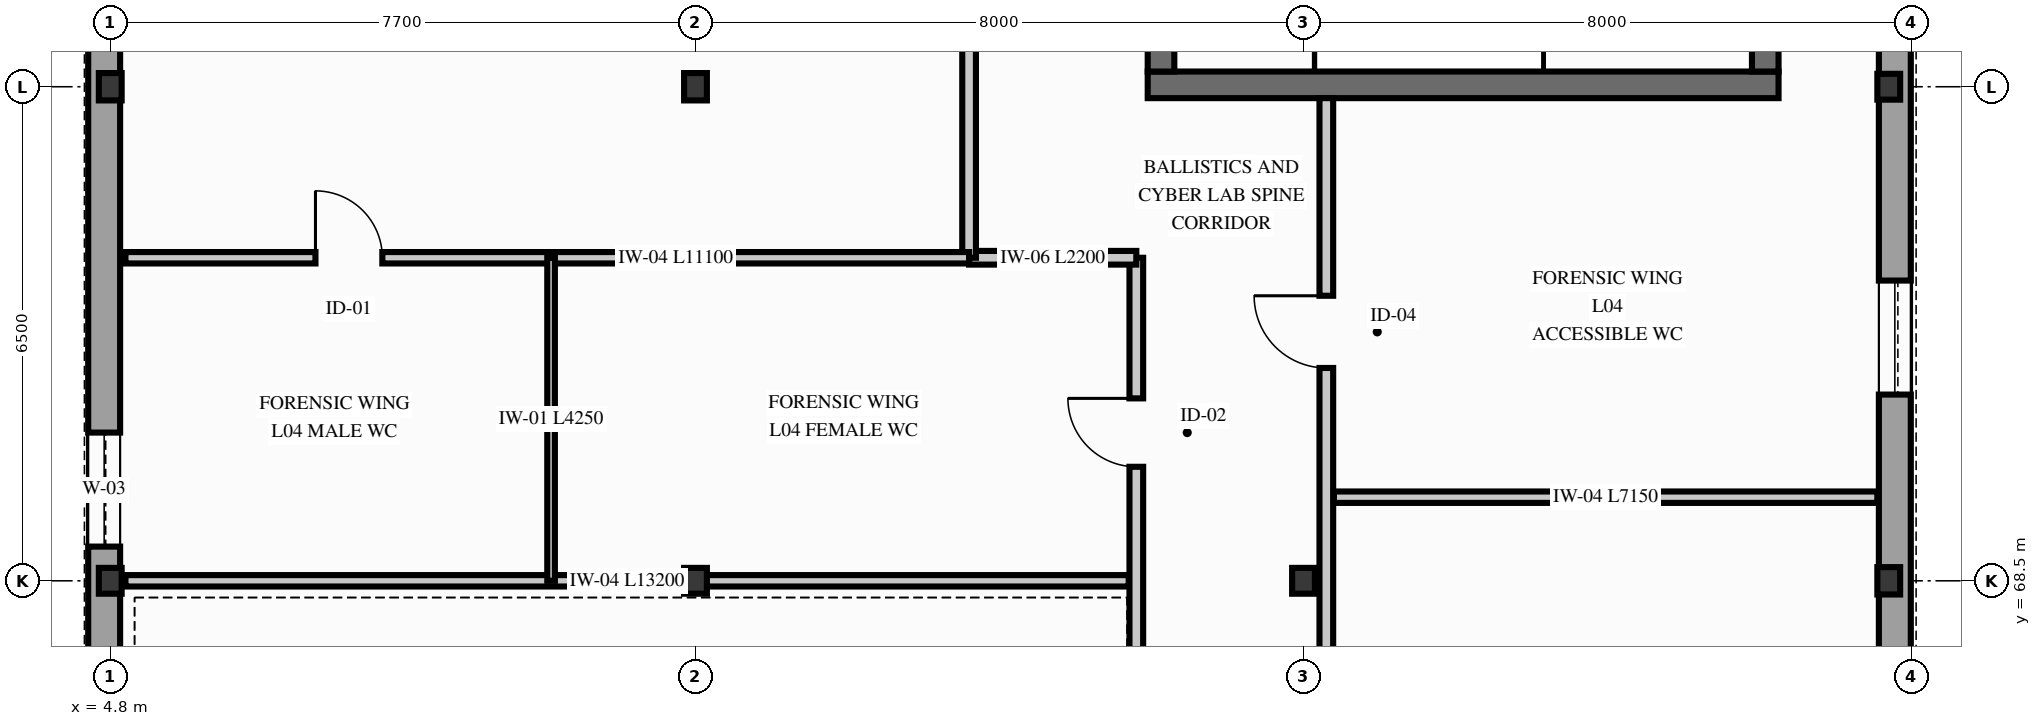
"""IFC4 building model, lengths in metres.
Left out: names, types, materials, properties, quantities, classifications, styles, units other than length and angle.
Written with IfcOpenShell. Run it as: python <this file> out.ifc"""

import sys

from ifc_helpers import new_model, si_unit, direction, frame, frame_2d, origin, origin_2d, place, context, subcontext, project, spatial, rectangle, i_section, extrude, element, fill, save


model = new_model("IFC4")
c1 = context("Model", 3, precision=1e-05, world=origin(), true_north=direction((0.0, 1.0)))
c2 = subcontext(c1, "Body", "Model", "MODEL_VIEW")
j1 = project(units=[si_unit("LENGTHUNIT", "METRE"), si_unit("PLANEANGLEUNIT", "RADIAN")], contexts=[c1])
p1 = place(None, origin())
s1 = spatial("IfcSite", under=j1, at=p1, CompositionType="ELEMENT")
p2 = place(p1, origin())
s2 = spatial("IfcBuilding", under=s1, at=p2, CompositionType="ELEMENT")
p3 = place(p2, frame((0.0, 0.0, 17.7)))
s3 = spatial("IfcBuildingStorey", under=s2, at=p3, CompositionType="ELEMENT", Elevation=17.7)
p4 = place(p3, frame((18.45, 75.025, 0.0), z_axis=(0.0, 0.0, 1.0), x_axis=(1.0, 0.0, 0.0)))
e1 = element("IfcWall", 1, at=p4, inside=s3, PredefinedType="SHEAR", context=c2, shape_type="SweptSolid", body=[
    extrude(rectangle(XDim=8.3, YDim=0.35, at=frame_2d((4.15, 0.0))), origin(), (0.0, 0.0, 1.0), 3.7),
])
p5 = place(p3, frame((18.625, 75.2, 0.0), z_axis=(0.0, 0.0, 1.0), x_axis=(0.0, 1.0, 0.0)))
e2 = element("IfcWall", 2, at=p5, inside=s3, PredefinedType="SHEAR", context=c2, shape_type="SweptSolid", body=[
    extrude(rectangle(XDim=6.8, YDim=0.35, at=frame_2d((3.4, 0.0))), origin(), (0.0, 0.0, 1.0), 3.7),
])
p6 = place(p5, frame((2.6, 0.0, 0.0)))
e3 = element("IfcOpeningElement", 3, at=p6, cuts=e2, PredefinedType="OPENING", context=c2, shape_type="SweptSolid", body=[
    extrude(rectangle(XDim=1.25, YDim=2.2, at=frame_2d((0.625, 1.1))), frame((0.0, 0.185, 0.0), z_axis=(0.0, -1.0, 0.0), x_axis=(1.0, 0.0, 0.0)), (0.0, 0.0, 1.0), 0.37),
])
p7 = place(p3, frame((26.575, 75.2, 0.0), z_axis=(0.0, 0.0, 1.0), x_axis=(0.0, 1.0, 0.0)))
e4 = element("IfcWall", 4, at=p7, inside=s3, PredefinedType="SHEAR", context=c2, shape_type="SweptSolid", body=[
    extrude(rectangle(XDim=6.8, YDim=0.35, at=frame_2d((3.4, 0.0))), origin(), (0.0, 0.0, 1.0), 3.7),
])
p8 = place(p3, frame((4.8, 68.5, 0.0), z_axis=(0.0, 0.0, 1.0), x_axis=(1.0, 0.0, 0.0)))
e5 = element("IfcColumn", 5, at=p8, inside=s3, PredefinedType="COLUMN", context=c2, shape_type="SweptSolid", body=[
    extrude(i_section(OverallWidth=0.3, OverallDepth=0.34, WebThickness=0.012, FlangeThickness=0.021, FilletRadius=0.027, at=origin_2d()), origin(), (0.0, 0.0, 1.0), 3.9),
])
p9 = place(p3, frame((4.8, 75.0, 0.0), z_axis=(0.0, 0.0, 1.0), x_axis=(1.0, 0.0, 0.0)))
e6 = element("IfcColumn", 6, at=p9, inside=s3, PredefinedType="COLUMN", context=c2, shape_type="SweptSolid", body=[
    extrude(i_section(OverallWidth=0.3, OverallDepth=0.36, WebThickness=0.012, FlangeThickness=0.022, FilletRadius=0.027, at=origin_2d()), origin(), (0.0, 0.0, 1.0), 3.9),
])
p10 = place(p3, frame((12.5, 68.5, 0.0), z_axis=(0.0, 0.0, 1.0), x_axis=(1.0, 0.0, 0.0)))
e7 = element("IfcColumn", 7, at=p10, inside=s3, PredefinedType="COLUMN", context=c2, shape_type="SweptSolid", body=[
    extrude(i_section(OverallWidth=0.3, OverallDepth=0.34, WebThickness=0.012, FlangeThickness=0.021, FilletRadius=0.027, at=origin_2d()), origin(), (0.0, 0.0, 1.0), 3.9),
])
p11 = place(p3, frame((12.5, 75.0, 0.0), z_axis=(0.0, 0.0, 1.0), x_axis=(1.0, 0.0, 0.0)))
e8 = element("IfcColumn", 8, at=p11, inside=s3, PredefinedType="COLUMN", context=c2, shape_type="SweptSolid", body=[
    extrude(i_section(OverallWidth=0.3, OverallDepth=0.36, WebThickness=0.012, FlangeThickness=0.022, FilletRadius=0.027, at=origin_2d()), origin(), (0.0, 0.0, 1.0), 3.9),
])
p12 = place(p3, frame((20.5, 68.5, 0.0), z_axis=(0.0, 0.0, 1.0), x_axis=(1.0, 0.0, 0.0)))
e9 = element("IfcColumn", 9, at=p12, inside=s3, PredefinedType="COLUMN", context=c2, shape_type="SweptSolid", body=[
    extrude(i_section(OverallWidth=0.3, OverallDepth=0.34, WebThickness=0.012, FlangeThickness=0.021, FilletRadius=0.027, at=origin_2d()), origin(), (0.0, 0.0, 1.0), 3.9),
])
p13 = place(p3, frame((28.2, 68.5, 0.0), z_axis=(0.0, 0.0, 1.0), x_axis=(1.0, 0.0, 0.0)))
e10 = element("IfcColumn", 10, at=p13, inside=s3, PredefinedType="COLUMN", context=c2, shape_type="SweptSolid", body=[
    extrude(i_section(OverallWidth=0.3, OverallDepth=0.36, WebThickness=0.012, FlangeThickness=0.022, FilletRadius=0.027, at=origin_2d()), origin(), (0.0, 0.0, 1.0), 3.9),
])
p14 = place(p3, frame((28.2, 75.0, 0.0), z_axis=(0.0, 0.0, 1.0), x_axis=(1.0, 0.0, 0.0)))
e11 = element("IfcColumn", 11, at=p14, inside=s3, PredefinedType="COLUMN", context=c2, shape_type="SweptSolid", body=[
    extrude(i_section(OverallWidth=0.3, OverallDepth=0.34, WebThickness=0.012, FlangeThickness=0.021, FilletRadius=0.027, at=origin_2d()), origin(), (0.0, 0.0, 1.0), 3.9),
])
p15 = place(p3, frame((4.72, 36.5, 0.0), z_axis=(0.0, 0.0, 1.0), x_axis=(0.0, 1.0, 0.0)))
e12 = element("IfcWall", 12, at=p15, inside=s3, PredefinedType="SOLIDWALL", context=c2, shape_type="SweptSolid", body=[
    extrude(rectangle(XDim=47.0, YDim=0.42, at=frame_2d((23.5, 0.0))), origin(), (0.0, 0.0, 1.0), 3.42),
])
p16 = place(p15, frame((1.65, 0.0, 0.74)))
e13 = element("IfcOpeningElement", 13, at=p16, cuts=e12, PredefinedType="OPENING", context=c2, shape_type="SweptSolid", body=[
    extrude(rectangle(XDim=1.6, YDim=2.4, at=frame_2d((0.8, 1.2))), frame((0.0, 0.22, 0.0), z_axis=(0.0, -1.0, 0.0), x_axis=(1.0, 0.0, 0.0)), (0.0, 0.0, 1.0), 0.44),
])
p17 = place(p15, frame((5.5, 0.0, 0.74)))
e14 = element("IfcOpeningElement", 14, at=p17, cuts=e12, PredefinedType="OPENING", context=c2, shape_type="SweptSolid", body=[
    extrude(rectangle(XDim=1.8, YDim=2.4, at=frame_2d((0.9, 1.2))), frame((0.0, 0.22, 0.0), z_axis=(0.0, -1.0, 0.0), x_axis=(1.0, 0.0, 0.0)), (0.0, 0.0, 1.0), 0.44),
])
p18 = place(p15, frame((9.35, 0.0, 0.84)))
e15 = element("IfcOpeningElement", 15, at=p18, cuts=e12, PredefinedType="OPENING", context=c2, shape_type="SweptSolid", body=[
    extrude(rectangle(XDim=1.5, YDim=2.3, at=frame_2d((0.75, 1.15))), frame((0.0, 0.22, 0.0), z_axis=(0.0, -1.0, 0.0), x_axis=(1.0, 0.0, 0.0)), (0.0, 0.0, 1.0), 0.44),
])
p19 = place(p15, frame((13.2, 0.0, 0.85)))
e16 = element("IfcOpeningElement", 16, at=p19, cuts=e12, PredefinedType="OPENING", context=c2, shape_type="SweptSolid", body=[
    extrude(rectangle(XDim=1.4, YDim=2.2, at=frame_2d((0.7, 1.1))), frame((0.0, 0.22, 0.0), z_axis=(0.0, -1.0, 0.0), x_axis=(1.0, 0.0, 0.0)), (0.0, 0.0, 1.0), 0.44),
])
p20 = place(p15, frame((20.9, 0.0, 0.74)))
e17 = element("IfcOpeningElement", 17, at=p20, cuts=e12, PredefinedType="OPENING", context=c2, shape_type="SweptSolid", body=[
    extrude(rectangle(XDim=2.4, YDim=2.4, at=frame_2d((1.2, 1.2))), frame((0.0, 0.22, 0.0), z_axis=(0.0, -1.0, 0.0), x_axis=(1.0, 0.0, 0.0)), (0.0, 0.0, 1.0), 0.44),
])
p21 = place(p15, frame((24.75, 0.0, 0.74)))
e18 = element("IfcOpeningElement", 18, at=p21, cuts=e12, PredefinedType="OPENING", context=c2, shape_type="SweptSolid", body=[
    extrude(rectangle(XDim=1.6, YDim=2.4, at=frame_2d((0.8, 1.2))), frame((0.0, 0.22, 0.0), z_axis=(0.0, -1.0, 0.0), x_axis=(1.0, 0.0, 0.0)), (0.0, 0.0, 1.0), 0.44),
])
p22 = place(p15, frame((28.6, 0.0, 0.74)))
e19 = element("IfcOpeningElement", 19, at=p22, cuts=e12, PredefinedType="OPENING", context=c2, shape_type="SweptSolid", body=[
    extrude(rectangle(XDim=1.8, YDim=2.4, at=frame_2d((0.9, 1.2))), frame((0.0, 0.22, 0.0), z_axis=(0.0, -1.0, 0.0), x_axis=(1.0, 0.0, 0.0)), (0.0, 0.0, 1.0), 0.44),
])
p23 = place(p15, frame((32.45, 0.0, 0.84)))
e20 = element("IfcOpeningElement", 20, at=p23, cuts=e12, PredefinedType="OPENING", context=c2, shape_type="SweptSolid", body=[
    extrude(rectangle(XDim=1.5, YDim=2.3, at=frame_2d((0.75, 1.15))), frame((0.0, 0.22, 0.0), z_axis=(0.0, -1.0, 0.0), x_axis=(1.0, 0.0, 0.0)), (0.0, 0.0, 1.0), 0.44),
])
p24 = place(p3, frame((28.28, 36.5, 0.0), z_axis=(0.0, 0.0, 1.0), x_axis=(0.0, 1.0, 0.0)))
e21 = element("IfcWall", 21, at=p24, inside=s3, PredefinedType="SOLIDWALL", context=c2, shape_type="SweptSolid", body=[
    extrude(rectangle(XDim=47.0, YDim=0.42, at=frame_2d((23.5, 0.0))), origin(), (0.0, 0.0, 1.0), 3.42),
])
p25 = place(p24, frame((1.65, 0.0, 0.74)))
e22 = element("IfcOpeningElement", 22, at=p25, cuts=e21, PredefinedType="OPENING", context=c2, shape_type="SweptSolid", body=[
    extrude(rectangle(XDim=1.6, YDim=2.4, at=frame_2d((0.8, 1.2))), frame((0.0, 0.22, 0.0), z_axis=(0.0, -1.0, 0.0), x_axis=(1.0, 0.0, 0.0)), (0.0, 0.0, 1.0), 0.44),
])
p26 = place(p24, frame((5.75, 0.0, 0.74)))
e23 = element("IfcOpeningElement", 23, at=p26, cuts=e21, PredefinedType="OPENING", context=c2, shape_type="SweptSolid", body=[
    extrude(rectangle(XDim=1.8, YDim=2.4, at=frame_2d((0.9, 1.2))), frame((0.0, 0.22, 0.0), z_axis=(0.0, -1.0, 0.0), x_axis=(1.0, 0.0, 0.0)), (0.0, 0.0, 1.0), 0.44),
])
p27 = place(p24, frame((9.85, 0.0, 0.84)))
e24 = element("IfcOpeningElement", 24, at=p27, cuts=e21, PredefinedType="OPENING", context=c2, shape_type="SweptSolid", body=[
    extrude(rectangle(XDim=1.5, YDim=2.3, at=frame_2d((0.75, 1.15))), frame((0.0, 0.22, 0.0), z_axis=(0.0, -1.0, 0.0), x_axis=(1.0, 0.0, 0.0)), (0.0, 0.0, 1.0), 0.44),
])
p28 = place(p24, frame((13.95, 0.0, 0.85)))
e25 = element("IfcOpeningElement", 25, at=p28, cuts=e21, PredefinedType="OPENING", context=c2, shape_type="SweptSolid", body=[
    extrude(rectangle(XDim=1.4, YDim=2.2, at=frame_2d((0.7, 1.1))), frame((0.0, 0.22, 0.0), z_axis=(0.0, -1.0, 0.0), x_axis=(1.0, 0.0, 0.0)), (0.0, 0.0, 1.0), 0.44),
])
p29 = place(p24, frame((26.25, 0.0, 0.74)))
e26 = element("IfcOpeningElement", 26, at=p29, cuts=e21, PredefinedType="OPENING", context=c2, shape_type="SweptSolid", body=[
    extrude(rectangle(XDim=1.6, YDim=2.4, at=frame_2d((0.8, 1.2))), frame((0.0, 0.22, 0.0), z_axis=(0.0, -1.0, 0.0), x_axis=(1.0, 0.0, 0.0)), (0.0, 0.0, 1.0), 0.44),
])
p30 = place(p24, frame((34.45, 0.0, 0.84)))
e27 = element("IfcOpeningElement", 27, at=p30, cuts=e21, PredefinedType="OPENING", context=c2, shape_type="SweptSolid", body=[
    extrude(rectangle(XDim=1.5, YDim=2.3, at=frame_2d((0.75, 1.15))), frame((0.0, 0.22, 0.0), z_axis=(0.0, -1.0, 0.0), x_axis=(1.0, 0.0, 0.0)), (0.0, 0.0, 1.0), 0.44),
])
p31 = place(p24, frame((42.65, 0.0, 0.54)))
e28 = element("IfcOpeningElement", 28, at=p31, cuts=e21, PredefinedType="OPENING", context=c2, shape_type="SweptSolid", body=[
    extrude(rectangle(XDim=2.2, YDim=2.6, at=frame_2d((1.1, 1.3))), frame((0.0, 0.22, 0.0), z_axis=(0.0, -1.0, 0.0), x_axis=(1.0, 0.0, 0.0)), (0.0, 0.0, 1.0), 0.44),
])
p32 = place(p3, frame((18.3, 36.8, 0.0), z_axis=(0.0, 0.0, 1.0), x_axis=(0.0, 1.0, 0.0)))
e29 = element("IfcWall", 29, at=p32, inside=s3, PredefinedType="PARTITIONING", context=c2, shape_type="SweptSolid", body=[
    extrude(rectangle(XDim=35.95, YDim=0.18, at=frame_2d((17.975, 0.0))), origin(), (0.0, 0.0, 1.0), 3.418),
])
p33 = place(p32, frame((7.0, 0.0, 0.0)))
e30 = element("IfcOpeningElement", 30, at=p33, cuts=e29, PredefinedType="OPENING", context=c2, shape_type="SweptSolid", body=[
    extrude(rectangle(XDim=1.02, YDim=2.18, at=frame_2d((0.51, 1.09))), frame((0.0, 0.1, 0.0), z_axis=(0.0, -1.0, 0.0), x_axis=(1.0, 0.0, 0.0)), (0.0, 0.0, 1.0), 0.2),
])
p34 = place(p32, frame((22.0, 0.0, 0.0)))
e31 = element("IfcOpeningElement", 31, at=p34, cuts=e29, PredefinedType="OPENING", context=c2, shape_type="SweptSolid", body=[
    extrude(rectangle(XDim=1.05, YDim=2.2, at=frame_2d((0.525, 1.1))), frame((0.0, 0.1, 0.0), z_axis=(0.0, -1.0, 0.0), x_axis=(1.0, 0.0, 0.0)), (0.0, 0.0, 1.0), 0.2),
])
p35 = place(p32, frame((33.2, 0.0, 0.0)))
e32 = element("IfcOpeningElement", 32, at=p35, cuts=e29, PredefinedType="OPENING", context=c2, shape_type="SweptSolid", body=[
    extrude(rectangle(XDim=0.9, YDim=2.1, at=frame_2d((0.45, 1.05))), frame((0.0, 0.1, 0.0), z_axis=(0.0, -1.0, 0.0), x_axis=(1.0, 0.0, 0.0)), (0.0, 0.0, 1.0), 0.2),
])
p36 = place(p3, frame((20.8, 36.8, 0.0), z_axis=(0.0, 0.0, 1.0), x_axis=(0.0, 1.0, 0.0)))
e33 = element("IfcWall", 33, at=p36, inside=s3, PredefinedType="PARTITIONING", context=c2, shape_type="SweptSolid", body=[
    extrude(rectangle(XDim=38.05, YDim=0.18, at=frame_2d((19.025, 0.0))), origin(), (0.0, 0.0, 1.0), 3.418),
])
p37 = place(p36, frame((5.65, 0.0, 0.0)))
e34 = element("IfcOpeningElement", 34, at=p37, cuts=e33, PredefinedType="OPENING", context=c2, shape_type="SweptSolid", body=[
    extrude(rectangle(XDim=1.08, YDim=2.22, at=frame_2d((0.54, 1.11))), frame((0.0, 0.1, 0.0), z_axis=(0.0, -1.0, 0.0), x_axis=(1.0, 0.0, 0.0)), (0.0, 0.0, 1.0), 0.2),
])
p38 = place(p36, frame((20.0, 0.0, 0.0)))
e35 = element("IfcOpeningElement", 35, at=p38, cuts=e33, PredefinedType="OPENING", context=c2, shape_type="SweptSolid", body=[
    extrude(rectangle(XDim=1.05, YDim=2.2, at=frame_2d((0.525, 1.1))), frame((0.0, 0.1, 0.0), z_axis=(0.0, -1.0, 0.0), x_axis=(1.0, 0.0, 0.0)), (0.0, 0.0, 1.0), 0.2),
])
p39 = place(p36, frame((34.5, 0.0, 0.0)))
e36 = element("IfcOpeningElement", 36, at=p39, cuts=e33, PredefinedType="OPENING", context=c2, shape_type="SweptSolid", body=[
    extrude(rectangle(XDim=0.95, YDim=2.15, at=frame_2d((0.475, 1.075))), frame((0.0, 0.1, 0.0), z_axis=(0.0, -1.0, 0.0), x_axis=(1.0, 0.0, 0.0)), (0.0, 0.0, 1.0), 0.2),
])
p40 = place(p3, frame((16.1, 72.75, 0.0), z_axis=(0.0, 0.0, 1.0), x_axis=(1.0, 0.0, 0.0)))
e37 = element("IfcWall", 37, at=p40, inside=s3, PredefinedType="PARTITIONING", context=c2, shape_type="SweptSolid", body=[
    extrude(rectangle(XDim=2.2, YDim=0.18, at=frame_2d((1.1, 0.0))), origin(), (0.0, 0.0, 1.0), 3.45),
])
p41 = place(p3, frame((16.1, 72.75, 0.0), z_axis=(0.0, 0.0, 1.0), x_axis=(0.0, 1.0, 0.0)))
e38 = element("IfcWall", 38, at=p41, inside=s3, PredefinedType="PARTITIONING", context=c2, shape_type="SweptSolid", body=[
    extrude(rectangle(XDim=10.3, YDim=0.18, at=frame_2d((5.15, 0.0))), origin(), (0.0, 0.0, 1.0), 3.68),
])
p42 = place(p41, frame((4.5, 0.0, 0.0)))
e39 = element("IfcOpeningElement", 39, at=p42, cuts=e38, PredefinedType="OPENING", context=c2, shape_type="SweptSolid", body=[
    extrude(rectangle(XDim=1.05, YDim=2.2, at=frame_2d((0.525, 1.1))), frame((0.0, 0.1, 0.0), z_axis=(0.0, -1.0, 0.0), x_axis=(1.0, 0.0, 0.0)), (0.0, 0.0, 1.0), 0.2),
])
p43 = place(p3, frame((5.0, 68.5, 0.0), z_axis=(0.0, 0.0, 1.0), x_axis=(1.0, 0.0, 0.0)))
e40 = element("IfcWall", 40, at=p43, inside=s3, PredefinedType="PARTITIONING", context=c2, shape_type="SweptSolid", body=[
    extrude(rectangle(XDim=13.2, YDim=0.15, at=frame_2d((6.6, 0.0))), origin(), (0.0, 0.0, 1.0), 3.29),
])
p44 = place(p3, frame((5.0, 72.75, 0.0), z_axis=(0.0, 0.0, 1.0), x_axis=(1.0, 0.0, 0.0)))
e41 = element("IfcWall", 41, at=p44, inside=s3, PredefinedType="PARTITIONING", context=c2, shape_type="SweptSolid", body=[
    extrude(rectangle(XDim=11.1, YDim=0.15, at=frame_2d((5.55, 0.0))), origin(), (0.0, 0.0, 1.0), 3.298),
])
p45 = place(p44, frame((2.5, 0.0, 0.0)))
e42 = element("IfcOpeningElement", 42, at=p45, cuts=e41, PredefinedType="OPENING", context=c2, shape_type="SweptSolid", body=[
    extrude(rectangle(XDim=0.88, YDim=2.1, at=frame_2d((0.44, 1.05))), frame((0.0, 0.085, 0.0), z_axis=(0.0, -1.0, 0.0), x_axis=(1.0, 0.0, 0.0)), (0.0, 0.0, 1.0), 0.17),
])
p46 = place(p3, frame((10.6, 68.5, 0.0), z_axis=(0.0, 0.0, 1.0), x_axis=(0.0, 1.0, 0.0)))
e43 = element("IfcWall", 43, at=p46, inside=s3, PredefinedType="PARTITIONING", context=c2, shape_type="SweptSolid", body=[
    extrude(rectangle(XDim=4.25, YDim=0.1, at=frame_2d((2.125, 0.0))), origin(), (0.0, 0.0, 1.0), 3.68),
])
p47 = place(p3, frame((20.9, 69.6, 0.0), z_axis=(0.0, 0.0, 1.0), x_axis=(1.0, 0.0, 0.0)))
e44 = element("IfcWall", 44, at=p47, inside=s3, PredefinedType="PARTITIONING", context=c2, shape_type="SweptSolid", body=[
    extrude(rectangle(XDim=7.15, YDim=0.15, at=frame_2d((3.575, 0.0))), origin(), (0.0, 0.0, 1.0), 3.68),
])
p48 = place(p30, origin())
e45 = element("IfcWindow", 45, at=p48, inside=s3, PartitioningType="SINGLE_PANEL", PredefinedType="WINDOW", context=c2, shape_type="SweptSolid", body=[
    extrude(rectangle(XDim=1.5, YDim=2.3, at=frame_2d((0.75, 1.15))), frame((0.0, 0.03, 0.0), z_axis=(0.0, -1.0, 0.0), x_axis=(1.0, 0.0, 0.0)), (0.0, 0.0, 1.0), 0.06),
])
fill(e27, e45)
p49 = place(p23, origin())
e46 = element("IfcWindow", 46, at=p49, inside=s3, PartitioningType="SINGLE_PANEL", PredefinedType="WINDOW", context=c2, shape_type="SweptSolid", body=[
    extrude(rectangle(XDim=1.5, YDim=2.3, at=frame_2d((0.75, 1.15))), frame((0.0, 0.03, 0.0), z_axis=(0.0, -1.0, 0.0), x_axis=(1.0, 0.0, 0.0)), (0.0, 0.0, 1.0), 0.06),
])
fill(e20, e46)
p50 = place(p35, origin())
e47 = element("IfcDoor", 47, at=p50, inside=s3, OperationType="SINGLE_SWING_RIGHT", PredefinedType="DOOR", context=c2, shape_type="SweptSolid", body=[
    extrude(rectangle(XDim=0.9, YDim=2.1, at=frame_2d((0.45, 1.05))), frame((0.0, 0.025, 0.0), z_axis=(0.0, -1.0, 0.0), x_axis=(1.0, 0.0, 0.0)), (0.0, 0.0, 1.0), 0.05),
])
fill(e32, e47)
p51 = place(p45, origin())
e48 = element("IfcDoor", 48, at=p51, inside=s3, OperationType="SINGLE_SWING_LEFT", PredefinedType="DOOR", context=c2, shape_type="SweptSolid", body=[
    extrude(rectangle(XDim=0.88, YDim=2.1, at=frame_2d((0.44, 1.05))), frame((0.0, 0.025, 0.0), z_axis=(0.0, -1.0, 0.0), x_axis=(1.0, 0.0, 0.0)), (0.0, 0.0, 1.0), 0.05),
])
fill(e42, e48)
p52 = place(p39, origin())
e49 = element("IfcDoor", 49, at=p52, inside=s3, OperationType="SINGLE_SWING_RIGHT", PredefinedType="DOOR", context=c2, shape_type="SweptSolid", body=[
    extrude(rectangle(XDim=0.95, YDim=2.15, at=frame_2d((0.475, 1.075))), frame((0.0, 0.025, 0.0), z_axis=(0.0, -1.0, 0.0), x_axis=(1.0, 0.0, 0.0)), (0.0, 0.0, 1.0), 0.05),
])
fill(e36, e49)
save(model, sys.argv[1])
